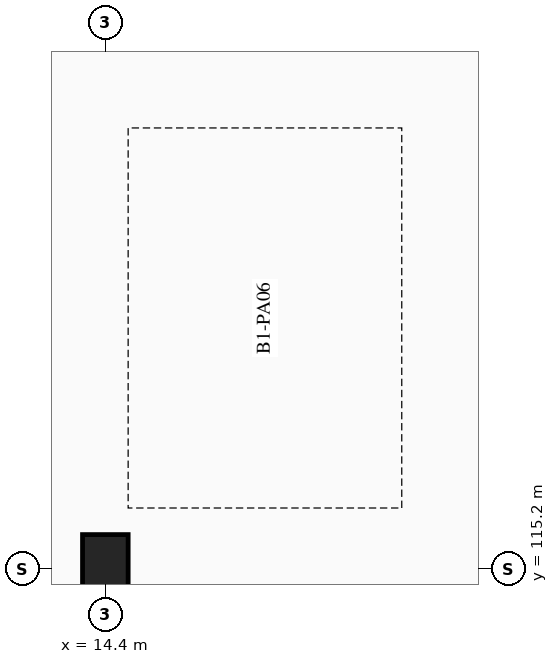
"""IFC4 building model, lengths in metres.
Left out: names, types, materials, properties, quantities, classifications, styles, units other than length and angle.
Written with IfcOpenShell. Run it as: python <this file> out.ifc"""

import sys

from ifc_helpers import new_model, si_unit, direction, frame, origin, origin_2d, place, context, subcontext, project, spatial, rectangle, extrude, element, save


model = new_model("IFC4")
c1 = context("Model", 3, precision=1e-05, world=origin(), true_north=direction((0.0, 1.0)))
c2 = subcontext(c1, "Body", "Model", "MODEL_VIEW")
j1 = project(units=[si_unit("LENGTHUNIT", "METRE"), si_unit("PLANEANGLEUNIT", "RADIAN")], contexts=[c1])
p1 = place(None, origin())
s1 = spatial("IfcSite", under=j1, at=p1, CompositionType="ELEMENT")
p2 = place(p1, origin())
s2 = spatial("IfcBuilding", under=s1, at=p2, CompositionType="ELEMENT")
p3 = place(p2, frame((0.0, 0.0, -4.5)))
s3 = spatial("IfcBuildingStorey", under=s2, at=p3, CompositionType="ELEMENT", Elevation=-4.5)
p4 = place(p3, frame((14.4, 115.2, -0.45), z_axis=(0.0, 0.0, 1.0), x_axis=(1.0, 0.0, 0.0)))
e1 = element("IfcColumn", 1, at=p4, inside=s3, PredefinedType="COLUMN", context=c2, shape_type="SweptSolid", body=[
    extrude(rectangle(XDim=0.6, YDim=0.9, at=origin_2d()), origin(), (0.0, 0.0, 1.0), 4.95),
])
save(model, sys.argv[1])
